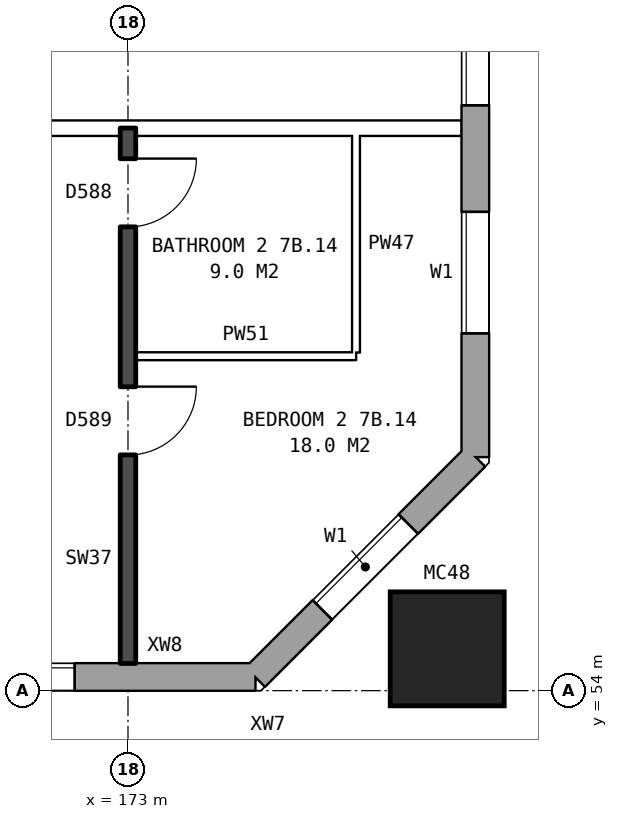
"""IFC4 building model, lengths in metres.
Left out: names, types, materials, properties, quantities, classifications, styles, units other than length and angle.
Written with IfcOpenShell. Run it as: python <this file> out.ifc"""

import sys

from ifc_helpers import new_model, si_unit, direction, frame, frame_2d, origin, origin_2d, place, context, subcontext, project, spatial, rectangle, hollow_rectangle, extrude, element, fill, save


model = new_model("IFC4")
c1 = context("Model", 3, precision=1e-05, world=origin(), true_north=direction((0.0, 1.0)))
c2 = subcontext(c1, "Body", "Model", "MODEL_VIEW")
j1 = project(units=[si_unit("LENGTHUNIT", "METRE"), si_unit("PLANEANGLEUNIT", "RADIAN")], contexts=[c1])
p1 = place(None, origin())
s1 = spatial("IfcSite", under=j1, at=p1, CompositionType="ELEMENT")
p2 = place(p1, origin())
s2 = spatial("IfcBuilding", under=s1, at=p2, CompositionType="ELEMENT")
p3 = place(p2, frame((0.0, 0.0, 28.8)))
s3 = spatial("IfcBuildingStorey", under=s2, at=p3, CompositionType="ELEMENT", Elevation=28.8)
p4 = place(p3, frame((177.2, 54.55, 0.0), z_axis=(0.0, 0.0, 1.0), x_axis=(1.0, 0.0, 0.0)))
e1 = element("IfcColumn", 1, at=p4, inside=s3, PredefinedType="COLUMN", context=c2, shape_type="SweptSolid", body=[
    extrude(hollow_rectangle(XDim=1.5, YDim=1.5, WallThickness=0.08, at=origin_2d()), origin(), (0.0, 0.0, 1.0), 3.1),
])
p5 = place(p3, frame((134.075, 54.18, 0.0), z_axis=(0.0, 0.0, 1.0), x_axis=(1.0, 0.0, 0.0)))
e2 = element("IfcWall", 2, at=p5, inside=s3, PredefinedType="STANDARD", context=c2, shape_type="SweptSolid", body=[
    extrude(rectangle(XDim=40.601, YDim=0.36, at=frame_2d((20.3, 0.0))), origin(), (0.0, 0.0, 1.0), 2.85),
])
p6 = place(p5, frame((0.625, 0.0, 0.8)))
e3 = element("IfcOpeningElement", 3, at=p6, cuts=e2, PredefinedType="OPENING", context=c2, shape_type="SweptSolid", body=[
    extrude(rectangle(XDim=1.6, YDim=1.8, at=frame_2d((0.8, 0.9))), frame((0.0, 0.19, 0.0), z_axis=(0.0, -1.0, 0.0), x_axis=(1.0, 0.0, 0.0)), (0.0, 0.0, 1.0), 0.38),
])
p7 = place(p5, frame((3.625, 0.0, 0.8)))
e4 = element("IfcOpeningElement", 4, at=p7, cuts=e2, PredefinedType="OPENING", context=c2, shape_type="SweptSolid", body=[
    extrude(rectangle(XDim=1.6, YDim=1.8, at=frame_2d((0.8, 0.9))), frame((0.0, 0.19, 0.0), z_axis=(0.0, -1.0, 0.0), x_axis=(1.0, 0.0, 0.0)), (0.0, 0.0, 1.0), 0.38),
])
p8 = place(p5, frame((6.625, 0.0, 0.8)))
e5 = element("IfcOpeningElement", 5, at=p8, cuts=e2, PredefinedType="OPENING", context=c2, shape_type="SweptSolid", body=[
    extrude(rectangle(XDim=1.6, YDim=1.8, at=frame_2d((0.8, 0.9))), frame((0.0, 0.19, 0.0), z_axis=(0.0, -1.0, 0.0), x_axis=(1.0, 0.0, 0.0)), (0.0, 0.0, 1.0), 0.38),
])
p9 = place(p5, frame((9.125, 0.0, 1.65)))
e6 = element("IfcOpeningElement", 6, at=p9, cuts=e2, PredefinedType="OPENING", context=c2, shape_type="SweptSolid", body=[
    extrude(rectangle(XDim=1.4, YDim=0.9, at=frame_2d((0.7, 0.45))), frame((0.0, 0.19, 0.0), z_axis=(0.0, -1.0, 0.0), x_axis=(1.0, 0.0, 0.0)), (0.0, 0.0, 1.0), 0.38),
])
p10 = place(p5, frame((12.075, 0.0, 0.8)))
e7 = element("IfcOpeningElement", 7, at=p10, cuts=e2, PredefinedType="OPENING", context=c2, shape_type="SweptSolid", body=[
    extrude(rectangle(XDim=0.6, YDim=0.9, at=frame_2d((0.3, 0.45))), frame((0.0, 0.19, 0.0), z_axis=(0.0, -1.0, 0.0), x_axis=(1.0, 0.0, 0.0)), (0.0, 0.0, 1.0), 0.38),
])
p11 = place(p5, frame((15.625, 0.0, 0.8)))
e8 = element("IfcOpeningElement", 8, at=p11, cuts=e2, PredefinedType="OPENING", context=c2, shape_type="SweptSolid", body=[
    extrude(rectangle(XDim=1.6, YDim=1.8, at=frame_2d((0.8, 0.9))), frame((0.0, 0.19, 0.0), z_axis=(0.0, -1.0, 0.0), x_axis=(1.0, 0.0, 0.0)), (0.0, 0.0, 1.0), 0.38),
])
p12 = place(p5, frame((18.625, 0.0, 0.8)))
e9 = element("IfcOpeningElement", 9, at=p12, cuts=e2, PredefinedType="OPENING", context=c2, shape_type="SweptSolid", body=[
    extrude(rectangle(XDim=1.6, YDim=1.8, at=frame_2d((0.8, 0.9))), frame((0.0, 0.19, 0.0), z_axis=(0.0, -1.0, 0.0), x_axis=(1.0, 0.0, 0.0)), (0.0, 0.0, 1.0), 0.38),
])
p13 = place(p5, frame((21.625, 0.0, 0.8)))
e10 = element("IfcOpeningElement", 10, at=p13, cuts=e2, PredefinedType="OPENING", context=c2, shape_type="SweptSolid", body=[
    extrude(rectangle(XDim=1.6, YDim=1.8, at=frame_2d((0.8, 0.9))), frame((0.0, 0.19, 0.0), z_axis=(0.0, -1.0, 0.0), x_axis=(1.0, 0.0, 0.0)), (0.0, 0.0, 1.0), 0.38),
])
p14 = place(p5, frame((24.625, 0.0, 0.8)))
e11 = element("IfcOpeningElement", 11, at=p14, cuts=e2, PredefinedType="OPENING", context=c2, shape_type="SweptSolid", body=[
    extrude(rectangle(XDim=1.6, YDim=1.8, at=frame_2d((0.8, 0.9))), frame((0.0, 0.19, 0.0), z_axis=(0.0, -1.0, 0.0), x_axis=(1.0, 0.0, 0.0)), (0.0, 0.0, 1.0), 0.38),
])
p15 = place(p5, frame((27.125, 0.0, 0.65)))
e12 = element("IfcOpeningElement", 12, at=p15, cuts=e2, PredefinedType="OPENING", context=c2, shape_type="SweptSolid", body=[
    extrude(rectangle(XDim=0.6, YDim=1.8, at=frame_2d((0.3, 0.9))), frame((0.0, 0.19, 0.0), z_axis=(0.0, -1.0, 0.0), x_axis=(1.0, 0.0, 0.0)), (0.0, 0.0, 1.0), 0.38),
])
p16 = place(p5, frame((30.125, 0.0, 1.6)))
e13 = element("IfcOpeningElement", 13, at=p16, cuts=e2, PredefinedType="OPENING", context=c2, shape_type="SweptSolid", body=[
    extrude(rectangle(XDim=0.6, YDim=0.9, at=frame_2d((0.3, 0.45))), frame((0.0, 0.19, 0.0), z_axis=(0.0, -1.0, 0.0), x_axis=(1.0, 0.0, 0.0)), (0.0, 0.0, 1.0), 0.38),
])
p17 = place(p5, frame((33.625, 0.0, 0.8)))
e14 = element("IfcOpeningElement", 14, at=p17, cuts=e2, PredefinedType="OPENING", context=c2, shape_type="SweptSolid", body=[
    extrude(rectangle(XDim=1.6, YDim=1.8, at=frame_2d((0.8, 0.9))), frame((0.0, 0.19, 0.0), z_axis=(0.0, -1.0, 0.0), x_axis=(1.0, 0.0, 0.0)), (0.0, 0.0, 1.0), 0.38),
])
p18 = place(p5, frame((36.625, 0.0, 0.8)))
e15 = element("IfcOpeningElement", 15, at=p18, cuts=e2, PredefinedType="OPENING", context=c2, shape_type="SweptSolid", body=[
    extrude(rectangle(XDim=1.6, YDim=1.8, at=frame_2d((0.8, 0.9))), frame((0.0, 0.19, 0.0), z_axis=(0.0, -1.0, 0.0), x_axis=(1.0, 0.0, 0.0)), (0.0, 0.0, 1.0), 0.38),
])
p19 = place(p5, frame((11.075, 0.0, 0.15)))
e16 = element("IfcOpeningElement", 16, at=p19, cuts=e2, PredefinedType="OPENING", context=c2, shape_type="SweptSolid", body=[
    extrude(rectangle(XDim=0.6, YDim=0.9, at=frame_2d((0.3, 0.45))), frame((0.0, 0.19, 0.0), z_axis=(0.0, -1.0, 0.0), x_axis=(1.0, 0.0, 0.0)), (0.0, 0.0, 1.0), 0.38),
])
p20 = place(p5, frame((13.025, 0.0, 0.8)))
e17 = element("IfcOpeningElement", 17, at=p20, cuts=e2, PredefinedType="OPENING", context=c2, shape_type="SweptSolid", body=[
    extrude(rectangle(XDim=1.6, YDim=1.8, at=frame_2d((0.8, 0.9))), frame((0.0, 0.19, 0.0), z_axis=(0.0, -1.0, 0.0), x_axis=(1.0, 0.0, 0.0)), (0.0, 0.0, 1.0), 0.38),
])
p21 = place(p5, frame((28.025, 0.0, 0.65)))
e18 = element("IfcOpeningElement", 18, at=p21, cuts=e2, PredefinedType="OPENING", context=c2, shape_type="SweptSolid", body=[
    extrude(rectangle(XDim=0.8, YDim=0.9, at=frame_2d((0.4, 0.45))), frame((0.0, 0.19, 0.0), z_axis=(0.0, -1.0, 0.0), x_axis=(1.0, 0.0, 0.0)), (0.0, 0.0, 1.0), 0.38),
])
p22 = place(p5, frame((31.075, 0.0, 0.8)))
e19 = element("IfcOpeningElement", 19, at=p22, cuts=e2, PredefinedType="OPENING", context=c2, shape_type="SweptSolid", body=[
    extrude(rectangle(XDim=1.6, YDim=1.8, at=frame_2d((0.8, 0.9))), frame((0.0, 0.19, 0.0), z_axis=(0.0, -1.0, 0.0), x_axis=(1.0, 0.0, 0.0)), (0.0, 0.0, 1.0), 0.38),
])
p23 = place(p3, frame((174.675, 54.18, 0.0), z_axis=(0.0, 0.0, 1.0), x_axis=(0.707106781187, 0.707106781187, 0.0)))
e20 = element("IfcWall", 20, at=p23, inside=s3, PredefinedType="STANDARD", context=c2, shape_type="SweptSolid", body=[
    extrude(rectangle(XDim=4.094, YDim=0.36, at=frame_2d((2.047, 0.0))), origin(), (0.0, 0.0, 1.0), 2.85),
])
p24 = place(p23, frame((1.247, 0.0, 0.8)))
e21 = element("IfcOpeningElement", 21, at=p24, cuts=e20, PredefinedType="OPENING", context=c2, shape_type="SweptSolid", body=[
    extrude(rectangle(XDim=1.6, YDim=1.8, at=frame_2d((0.8, 0.9))), frame((0.0, 0.19, 0.0), z_axis=(0.0, -1.0, 0.0), x_axis=(1.0, 0.0, 0.0)), (0.0, 0.0, 1.0), 0.38),
])
p25 = place(p3, frame((177.57, 57.075, 0.0), z_axis=(0.0, 0.0, 1.0), x_axis=(0.0, 1.0, 0.0)))
e22 = element("IfcWall", 22, at=p25, inside=s3, PredefinedType="STANDARD", context=c2, shape_type="SweptSolid", body=[
    extrude(rectangle(XDim=25.851, YDim=0.36, at=frame_2d((12.925, 0.0))), origin(), (0.0, 0.0, 1.0), 2.85),
])
p26 = place(p25, frame((1.625, 0.0, 0.8)))
e23 = element("IfcOpeningElement", 23, at=p26, cuts=e22, PredefinedType="OPENING", context=c2, shape_type="SweptSolid", body=[
    extrude(rectangle(XDim=1.6, YDim=1.8, at=frame_2d((0.8, 0.9))), frame((0.0, 0.19, 0.0), z_axis=(0.0, -1.0, 0.0), x_axis=(1.0, 0.0, 0.0)), (0.0, 0.0, 1.0), 0.38),
])
p27 = place(p25, frame((4.625, 0.0, 0.8)))
e24 = element("IfcOpeningElement", 24, at=p27, cuts=e22, PredefinedType="OPENING", context=c2, shape_type="SweptSolid", body=[
    extrude(rectangle(XDim=1.6, YDim=1.8, at=frame_2d((0.8, 0.9))), frame((0.0, 0.19, 0.0), z_axis=(0.0, -1.0, 0.0), x_axis=(1.0, 0.0, 0.0)), (0.0, 0.0, 1.0), 0.38),
])
p28 = place(p25, frame((6.525, 0.0, 0.8)))
e25 = element("IfcOpeningElement", 25, at=p28, cuts=e22, PredefinedType="OPENING", context=c2, shape_type="SweptSolid", body=[
    extrude(rectangle(XDim=1.0, YDim=1.8, at=frame_2d((0.5, 0.9))), frame((0.0, 0.19, 0.0), z_axis=(0.0, -1.0, 0.0), x_axis=(1.0, 0.0, 0.0)), (0.0, 0.0, 1.0), 0.38),
])
p29 = place(p25, frame((7.825, 0.0, 0.8)))
e26 = element("IfcOpeningElement", 26, at=p29, cuts=e22, PredefinedType="OPENING", context=c2, shape_type="SweptSolid", body=[
    extrude(rectangle(XDim=1.2, YDim=0.9, at=frame_2d((0.6, 0.45))), frame((0.0, 0.19, 0.0), z_axis=(0.0, -1.0, 0.0), x_axis=(1.0, 0.0, 0.0)), (0.0, 0.0, 1.0), 0.38),
])
p30 = place(p25, frame((10.325, 0.0, 1.7)))
e27 = element("IfcOpeningElement", 27, at=p30, cuts=e22, PredefinedType="OPENING", context=c2, shape_type="SweptSolid", body=[
    extrude(rectangle(XDim=1.2, YDim=0.9, at=frame_2d((0.6, 0.45))), frame((0.0, 0.19, 0.0), z_axis=(0.0, -1.0, 0.0), x_axis=(1.0, 0.0, 0.0)), (0.0, 0.0, 1.0), 0.38),
])
p31 = place(p25, frame((11.825, 0.0, 0.8)))
e28 = element("IfcOpeningElement", 28, at=p31, cuts=e22, PredefinedType="OPENING", context=c2, shape_type="SweptSolid", body=[
    extrude(rectangle(XDim=1.6, YDim=1.8, at=frame_2d((0.8, 0.9))), frame((0.0, 0.19, 0.0), z_axis=(0.0, -1.0, 0.0), x_axis=(1.0, 0.0, 0.0)), (0.0, 0.0, 1.0), 0.38),
])
p32 = place(p25, frame((19.625, 0.0, 0.8)))
e29 = element("IfcOpeningElement", 29, at=p32, cuts=e22, PredefinedType="OPENING", context=c2, shape_type="SweptSolid", body=[
    extrude(rectangle(XDim=1.6, YDim=1.8, at=frame_2d((0.8, 0.9))), frame((0.0, 0.19, 0.0), z_axis=(0.0, -1.0, 0.0), x_axis=(1.0, 0.0, 0.0)), (0.0, 0.0, 1.0), 0.38),
])
p33 = place(p25, frame((22.625, 0.0, 0.8)))
e30 = element("IfcOpeningElement", 30, at=p33, cuts=e22, PredefinedType="OPENING", context=c2, shape_type="SweptSolid", body=[
    extrude(rectangle(XDim=1.6, YDim=1.8, at=frame_2d((0.8, 0.9))), frame((0.0, 0.19, 0.0), z_axis=(0.0, -1.0, 0.0), x_axis=(1.0, 0.0, 0.0)), (0.0, 0.0, 1.0), 0.38),
])
p34 = place(p25, frame((13.725, 0.0, 1.1)))
e31 = element("IfcOpeningElement", 31, at=p34, cuts=e22, PredefinedType="OPENING", context=c2, shape_type="SweptSolid", body=[
    extrude(rectangle(XDim=0.8, YDim=1.5, at=frame_2d((0.4, 0.75))), frame((0.0, 0.19, 0.0), z_axis=(0.0, -1.0, 0.0), x_axis=(1.0, 0.0, 0.0)), (0.0, 0.0, 1.0), 0.38),
])
p35 = place(p25, frame((14.825, 0.0, 1.7)))
e32 = element("IfcOpeningElement", 32, at=p35, cuts=e22, PredefinedType="OPENING", context=c2, shape_type="SweptSolid", body=[
    extrude(rectangle(XDim=0.6, YDim=0.9, at=frame_2d((0.3, 0.45))), frame((0.0, 0.19, 0.0), z_axis=(0.0, -1.0, 0.0), x_axis=(1.0, 0.0, 0.0)), (0.0, 0.0, 1.0), 0.38),
])
p36 = place(p25, frame((16.775, 0.0, 0.8)))
e33 = element("IfcOpeningElement", 33, at=p36, cuts=e22, PredefinedType="OPENING", context=c2, shape_type="SweptSolid", body=[
    extrude(rectangle(XDim=1.2, YDim=0.9, at=frame_2d((0.6, 0.45))), frame((0.0, 0.19, 0.0), z_axis=(0.0, -1.0, 0.0), x_axis=(1.0, 0.0, 0.0)), (0.0, 0.0, 1.0), 0.38),
])
p37 = place(p25, frame((18.275, 0.0, 0.8)))
e34 = element("IfcOpeningElement", 34, at=p37, cuts=e22, PredefinedType="OPENING", context=c2, shape_type="SweptSolid", body=[
    extrude(rectangle(XDim=1.0, YDim=1.8, at=frame_2d((0.5, 0.9))), frame((0.0, 0.19, 0.0), z_axis=(0.0, -1.0, 0.0), x_axis=(1.0, 0.0, 0.0)), (0.0, 0.0, 1.0), 0.38),
])
p38 = place(p3, frame((173.1, 58.4, 0.0), z_axis=(0.0, 0.0, 1.0), x_axis=(1.0, 0.0, 0.0)))
e35 = element("IfcWall", 35, at=p38, inside=s3, PredefinedType="PARTITIONING", context=c2, shape_type="SweptSolid", body=[
    extrude(rectangle(XDim=2.9, YDim=0.1, at=frame_2d((1.45, 0.0))), origin(), (0.0, 0.0, 1.0), 2.85),
])
p39 = place(p3, frame((155.1, 61.4, 0.0), z_axis=(0.0, 0.0, 1.0), x_axis=(1.0, 0.0, 0.0)))
e36 = element("IfcWall", 36, at=p39, inside=s3, PredefinedType="PARTITIONING", context=c2, shape_type="SweptSolid", body=[
    extrude(rectangle(XDim=22.29, YDim=0.2, at=frame_2d((11.145, 0.0))), origin(), (0.0, 0.0, 1.0), 2.85),
])
p40 = place(p39, frame((2.45, 0.0, 0.0)))
e37 = element("IfcOpeningElement", 37, at=p40, cuts=e36, PredefinedType="OPENING", context=c2, shape_type="SweptSolid", body=[
    extrude(rectangle(XDim=1.0, YDim=2.1, at=frame_2d((0.5, 1.05))), frame((0.0, 0.11, 0.0), z_axis=(0.0, -1.0, 0.0), x_axis=(1.0, 0.0, 0.0)), (0.0, 0.0, 1.0), 0.22),
])
p41 = place(p39, frame((14.4, 0.0, 0.0)))
e38 = element("IfcOpeningElement", 38, at=p41, cuts=e36, PredefinedType="OPENING", context=c2, shape_type="SweptSolid", body=[
    extrude(rectangle(XDim=1.0, YDim=2.1, at=frame_2d((0.5, 1.05))), frame((0.0, 0.11, 0.0), z_axis=(0.0, -1.0, 0.0), x_axis=(1.0, 0.0, 0.0)), (0.0, 0.0, 1.0), 0.22),
])
p42 = place(p3, frame((173.0, 54.36, 0.0), z_axis=(0.0, 0.0, 1.0), x_axis=(0.0, 1.0, 0.0)))
e39 = element("IfcWall", 39, at=p42, inside=s3, PredefinedType="SOLIDWALL", context=c2, shape_type="SweptSolid", body=[
    extrude(rectangle(XDim=7.04, YDim=0.2, at=frame_2d((3.52, 0.0))), origin(), (0.0, 0.0, 1.0), 2.85),
])
p43 = place(p42, frame((2.74, 0.0, 0.0)))
e40 = element("IfcOpeningElement", 40, at=p43, cuts=e39, PredefinedType="OPENING", context=c2, shape_type="SweptSolid", body=[
    extrude(rectangle(XDim=0.9, YDim=2.1, at=frame_2d((0.45, 1.05))), frame((0.0, 0.11, 0.0), z_axis=(0.0, -1.0, 0.0), x_axis=(1.0, 0.0, 0.0)), (0.0, 0.0, 1.0), 0.22),
])
p44 = place(p42, frame((5.74, 0.0, 0.0)))
e41 = element("IfcOpeningElement", 41, at=p44, cuts=e39, PredefinedType="OPENING", context=c2, shape_type="SweptSolid", body=[
    extrude(rectangle(XDim=0.9, YDim=2.1, at=frame_2d((0.45, 1.05))), frame((0.0, 0.11, 0.0), z_axis=(0.0, -1.0, 0.0), x_axis=(1.0, 0.0, 0.0)), (0.0, 0.0, 1.0), 0.22),
])
p45 = place(p3, frame((176.0, 58.45, 0.0), z_axis=(0.0, 0.0, 1.0), x_axis=(0.0, 1.0, 0.0)))
e42 = element("IfcWall", 42, at=p45, inside=s3, PredefinedType="PARTITIONING", context=c2, shape_type="SweptSolid", body=[
    extrude(rectangle(XDim=2.85, YDim=0.1, at=frame_2d((1.425, 0.0))), origin(), (0.0, 0.0, 1.0), 2.85),
])
p46 = place(p18, origin())
e43 = element("IfcWindow", 43, at=p46, inside=s3, PartitioningType="SINGLE_PANEL", PredefinedType="WINDOW", context=c2, shape_type="SweptSolid", body=[
    extrude(rectangle(XDim=1.6, YDim=1.8, at=frame_2d((0.8, 0.9))), frame((0.0, 0.15, 0.0), z_axis=(0.0, -1.0, 0.0), x_axis=(1.0, 0.0, 0.0)), (0.0, 0.0, 1.0), 0.06),
])
fill(e15, e43)
p47 = place(p24, origin())
e44 = element("IfcWindow", 44, at=p47, inside=s3, PartitioningType="SINGLE_PANEL", PredefinedType="WINDOW", context=c2, shape_type="SweptSolid", body=[
    extrude(rectangle(XDim=1.6, YDim=1.8, at=frame_2d((0.8, 0.9))), frame((0.0, 0.15, 0.0), z_axis=(0.0, -1.0, 0.0), x_axis=(1.0, 0.0, 0.0)), (0.0, 0.0, 1.0), 0.06),
])
fill(e21, e44)
p48 = place(p26, origin())
e45 = element("IfcWindow", 45, at=p48, inside=s3, PartitioningType="SINGLE_PANEL", PredefinedType="WINDOW", context=c2, shape_type="SweptSolid", body=[
    extrude(rectangle(XDim=1.6, YDim=1.8, at=frame_2d((0.8, 0.9))), frame((0.0, 0.15, 0.0), z_axis=(0.0, -1.0, 0.0), x_axis=(1.0, 0.0, 0.0)), (0.0, 0.0, 1.0), 0.06),
])
fill(e23, e45)
p49 = place(p27, origin())
e46 = element("IfcWindow", 46, at=p49, inside=s3, PartitioningType="SINGLE_PANEL", PredefinedType="WINDOW", context=c2, shape_type="SweptSolid", body=[
    extrude(rectangle(XDim=1.6, YDim=1.8, at=frame_2d((0.8, 0.9))), frame((0.0, 0.15, 0.0), z_axis=(0.0, -1.0, 0.0), x_axis=(1.0, 0.0, 0.0)), (0.0, 0.0, 1.0), 0.06),
])
fill(e24, e46)
p50 = place(p43, frame((0.9, 0.0, 0.0), z_axis=(0.0, 0.0, 1.0), x_axis=(-1.0, 0.0, 0.0)))
e47 = element("IfcDoor", 47, at=p50, inside=s3, OperationType="SINGLE_SWING_LEFT", PredefinedType="DOOR", context=c2, shape_type="SweptSolid", body=[
    extrude(rectangle(XDim=0.9, YDim=2.1, at=frame_2d((0.45, 1.05))), frame((0.0, 0.025, 0.0), z_axis=(0.0, -1.0, 0.0), x_axis=(1.0, 0.0, 0.0)), (0.0, 0.0, 1.0), 0.05),
])
fill(e40, e47)
p51 = place(p44, frame((0.9, 0.0, 0.0), z_axis=(0.0, 0.0, 1.0), x_axis=(-1.0, 0.0, 0.0)))
e48 = element("IfcDoor", 48, at=p51, inside=s3, OperationType="SINGLE_SWING_LEFT", PredefinedType="DOOR", context=c2, shape_type="SweptSolid", body=[
    extrude(rectangle(XDim=0.9, YDim=2.1, at=frame_2d((0.45, 1.05))), frame((0.0, 0.025, 0.0), z_axis=(0.0, -1.0, 0.0), x_axis=(1.0, 0.0, 0.0)), (0.0, 0.0, 1.0), 0.05),
])
fill(e41, e48)
save(model, sys.argv[1])
